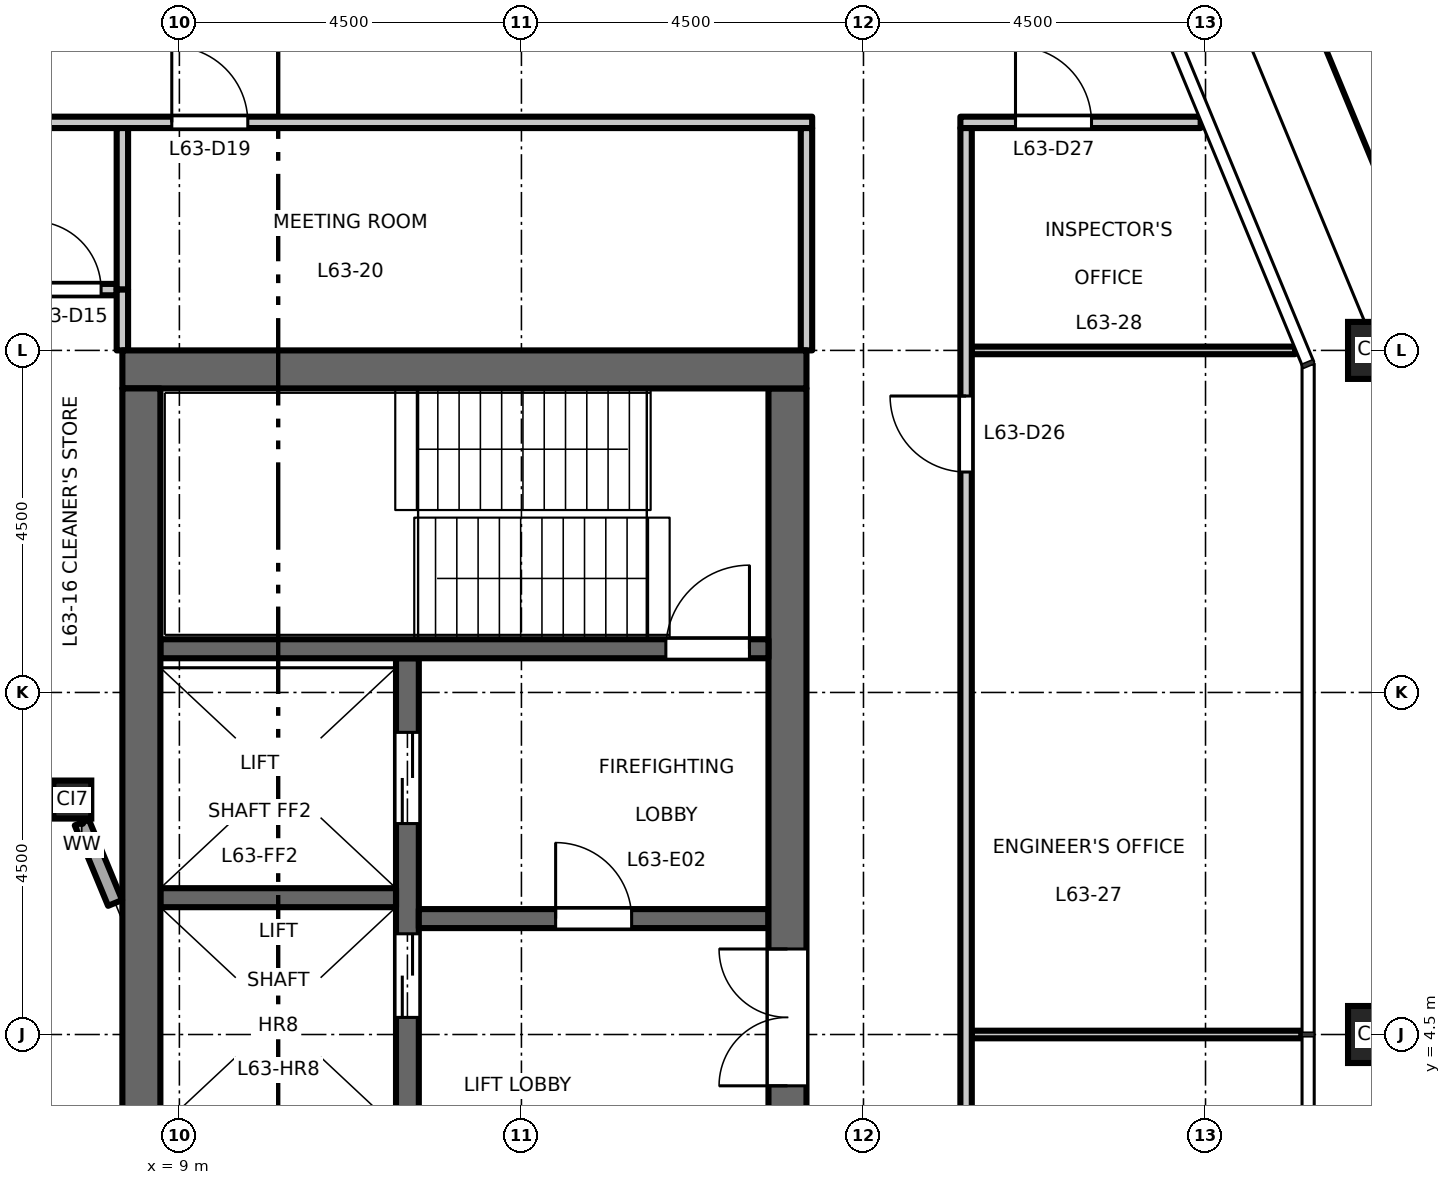
"""IFC4 building model, lengths in metres.
Left out: names, types, materials, properties, quantities, classifications, styles, units other than length and angle.
Written with IfcOpenShell. Run it as: python <this file> out.ifc"""

import sys

from ifc_helpers import new_model, si_unit, direction, frame, frame_2d, origin, origin_2d, place, context, subcontext, project, spatial, rectangle, hollow_rectangle, extrude, element, fill, save


model = new_model("IFC4")
c1 = context("Model", 3, precision=1e-05, world=origin(), true_north=direction((0.0, 1.0)))
c2 = subcontext(c1, "Body", "Model", "MODEL_VIEW")
j1 = project(units=[si_unit("LENGTHUNIT", "METRE"), si_unit("PLANEANGLEUNIT", "RADIAN")], contexts=[c1])
p1 = place(None, origin())
s1 = spatial("IfcSite", under=j1, at=p1, CompositionType="ELEMENT")
p2 = place(p1, origin())
s2 = spatial("IfcBuilding", under=s1, at=p2, CompositionType="ELEMENT")
p3 = place(p2, frame((0.0, 0.0, 294.2)))
s3 = spatial("IfcBuildingStorey", under=s2, at=p3, CompositionType="ELEMENT", Elevation=294.2)
for number, where, z_axis, x_axis in (
    (1, (24.75, 4.5, 0.0), (0.0, 0.0, 1.0), (1.0, 0.0, 0.0)),
    (2, (24.75, 13.5, 0.0), (0.0, 0.0, 1.0), (1.0, 0.0, 0.0)),
):
    element("IfcColumn", number, at=place(p3, frame(where, z_axis=z_axis, x_axis=x_axis)), inside=s3, PredefinedType="COLUMN", context=c2, shape_type="SweptSolid", body=[
        extrude(hollow_rectangle(XDim=0.75, YDim=0.75, WallThickness=0.04, at=origin_2d()), origin(), (0.0, 0.0, 1.0), 4.5),
    ])
p4 = place(p3, frame((7.591, 7.591, 0.0), z_axis=(0.0, 0.0, 1.0), x_axis=(1.0, 0.0, 0.0)))
e3 = element("IfcColumn", 3, at=p4, inside=s3, PredefinedType="COLUMN", context=c2, shape_type="SweptSolid", body=[
    extrude(hollow_rectangle(XDim=0.5, YDim=0.5, WallThickness=0.025, at=origin_2d()), origin(), (0.0, 0.0, 1.0), 4.5),
])
p5 = place(p3, frame((12.0, -9.45, 0.0), z_axis=(0.0, 0.0, 1.0), x_axis=(0.0, 1.0, 0.0)))
e4 = element("IfcWall", 4, at=p5, inside=s3, PredefinedType="SHEAR", context=c2, shape_type="SweptSolid", body=[
    extrude(rectangle(XDim=18.9, YDim=0.3, at=frame_2d((9.45, 0.0))), origin(), (0.0, 0.0, 1.0), 4.35),
])
p6 = place(p5, frame((4.725, 0.0, 0.0)))
e5 = element("IfcOpeningElement", 5, at=p6, cuts=e4, PredefinedType="OPENING", context=c2, shape_type="SweptSolid", body=[
    extrude(rectangle(XDim=1.1, YDim=2.1, at=frame_2d((0.55, 1.05))), frame((0.0, 0.16, 0.0), z_axis=(0.0, -1.0, 0.0), x_axis=(1.0, 0.0, 0.0)), (0.0, 0.0, 1.0), 0.32),
])
p7 = place(p5, frame((7.875, 0.0, 0.0)))
e6 = element("IfcOpeningElement", 6, at=p7, cuts=e4, PredefinedType="OPENING", context=c2, shape_type="SweptSolid", body=[
    extrude(rectangle(XDim=1.1, YDim=2.1, at=frame_2d((0.55, 1.05))), frame((0.0, 0.16, 0.0), z_axis=(0.0, -1.0, 0.0), x_axis=(1.0, 0.0, 0.0)), (0.0, 0.0, 1.0), 0.32),
])
p8 = place(p5, frame((11.025, 0.0, 0.0)))
e7 = element("IfcOpeningElement", 7, at=p8, cuts=e4, PredefinedType="OPENING", context=c2, shape_type="SweptSolid", body=[
    extrude(rectangle(XDim=1.1, YDim=2.1, at=frame_2d((0.55, 1.05))), frame((0.0, 0.16, 0.0), z_axis=(0.0, -1.0, 0.0), x_axis=(1.0, 0.0, 0.0)), (0.0, 0.0, 1.0), 0.32),
])
p9 = place(p5, frame((14.175, 0.0, 0.0)))
e8 = element("IfcOpeningElement", 8, at=p9, cuts=e4, PredefinedType="OPENING", context=c2, shape_type="SweptSolid", body=[
    extrude(rectangle(XDim=1.1, YDim=2.1, at=frame_2d((0.55, 1.05))), frame((0.0, 0.16, 0.0), z_axis=(0.0, -1.0, 0.0), x_axis=(1.0, 0.0, 0.0)), (0.0, 0.0, 1.0), 0.32),
])
p10 = place(p5, frame((16.725, 0.0, 0.0)))
e9 = element("IfcOpeningElement", 9, at=p10, cuts=e4, PredefinedType="OPENING", context=c2, shape_type="SweptSolid", body=[
    extrude(rectangle(XDim=1.2, YDim=2.1, at=frame_2d((0.6, 1.05))), frame((0.0, 0.16, 0.0), z_axis=(0.0, -1.0, 0.0), x_axis=(1.0, 0.0, 0.0)), (0.0, 0.0, 1.0), 0.32),
])
p11 = place(p5, frame((0.975, 0.0, 0.0)))
e10 = element("IfcOpeningElement", 10, at=p11, cuts=e4, PredefinedType="OPENING", context=c2, shape_type="SweptSolid", body=[
    extrude(rectangle(XDim=1.2, YDim=2.1, at=frame_2d((0.6, 1.05))), frame((0.0, 0.16, 0.0), z_axis=(0.0, -1.0, 0.0), x_axis=(1.0, 0.0, 0.0)), (0.0, 0.0, 1.0), 0.32),
])
p12 = place(p3, frame((12.15, 6.025, 0.0), z_axis=(0.0, 0.0, 1.0), x_axis=(1.0, 0.0, 0.0)))
e11 = element("IfcWall", 11, at=p12, inside=s3, PredefinedType="SHEAR", context=c2, shape_type="SweptSolid", body=[
    extrude(rectangle(XDim=4.6, YDim=0.25, at=frame_2d((2.3, 0.0))), origin(), (0.0, 0.0, 1.0), 4.35),
])
p13 = place(p12, frame((1.8, 0.0, 0.0)))
e12 = element("IfcOpeningElement", 12, at=p13, cuts=e11, PredefinedType="OPENING", context=c2, shape_type="SweptSolid", body=[
    extrude(rectangle(XDim=1.0, YDim=2.1, at=frame_2d((0.5, 1.05))), frame((0.0, 0.135, 0.0), z_axis=(0.0, -1.0, 0.0), x_axis=(1.0, 0.0, 0.0)), (0.0, 0.0, 1.0), 0.27),
])
p14 = place(p3, frame((17.0, -13.0, 0.0), z_axis=(0.0, 0.0, 1.0), x_axis=(0.0, 1.0, 0.0)))
e13 = element("IfcWall", 13, at=p14, inside=s3, PredefinedType="SHEAR", context=c2, shape_type="SweptSolid", body=[
    extrude(rectangle(XDim=26.0, YDim=0.5, at=frame_2d((13.0, 0.0))), origin(), (0.0, 0.0, 1.0), 4.35),
])
p15 = place(p14, frame((16.825, 0.0, 0.0)))
e14 = element("IfcOpeningElement", 14, at=p15, cuts=e13, PredefinedType="OPENING", context=c2, shape_type="SweptSolid", body=[
    extrude(rectangle(XDim=1.8, YDim=2.1, at=frame_2d((0.9, 1.05))), frame((0.0, 0.26, 0.0), z_axis=(0.0, -1.0, 0.0), x_axis=(1.0, 0.0, 0.0)), (0.0, 0.0, 1.0), 0.52),
])
p16 = place(p14, frame((7.375, 0.0, 0.0)))
e15 = element("IfcOpeningElement", 15, at=p16, cuts=e13, PredefinedType="OPENING", context=c2, shape_type="SweptSolid", body=[
    extrude(rectangle(XDim=1.8, YDim=2.1, at=frame_2d((0.9, 1.05))), frame((0.0, 0.26, 0.0), z_axis=(0.0, -1.0, 0.0), x_axis=(1.0, 0.0, 0.0)), (0.0, 0.0, 1.0), 0.52),
])
p17 = place(p3, frame((8.75, 6.3, 0.0), z_axis=(0.0, 0.0, 1.0), x_axis=(1.0, 0.0, 0.0)))
e16 = element("IfcWall", 16, at=p17, inside=s3, PredefinedType="SHEAR", context=c2, shape_type="SweptSolid", body=[
    extrude(rectangle(XDim=3.1, YDim=0.25, at=frame_2d((1.55, 0.0))), origin(), (0.0, 0.0, 1.0), 4.35),
])
p18 = place(p3, frame((8.75, 9.575, 0.0), z_axis=(0.0, 0.0, 1.0), x_axis=(1.0, 0.0, 0.0)))
e17 = element("IfcWall", 17, at=p18, inside=s3, PredefinedType="SHEAR", context=c2, shape_type="SweptSolid", body=[
    extrude(rectangle(XDim=8.0, YDim=0.25, at=frame_2d((4.0, 0.0))), origin(), (0.0, 0.0, 1.0), 4.35),
])
p19 = place(p18, frame((6.65, 0.0, 0.0)))
e18 = element("IfcOpeningElement", 18, at=p19, cuts=e17, PredefinedType="OPENING", context=c2, shape_type="SweptSolid", body=[
    extrude(rectangle(XDim=1.1, YDim=2.1, at=frame_2d((0.55, 1.05))), frame((0.0, 0.135, 0.0), z_axis=(0.0, -1.0, 0.0), x_axis=(1.0, 0.0, 0.0)), (0.0, 0.0, 1.0), 0.27),
])
p20 = place(p3, frame((8.25, 13.25, 0.0), z_axis=(0.0, 0.0, 1.0), x_axis=(1.0, 0.0, 0.0)))
e19 = element("IfcWall", 19, at=p20, inside=s3, PredefinedType="SHEAR", context=c2, shape_type="SweptSolid", body=[
    extrude(rectangle(XDim=9.0, YDim=0.5, at=frame_2d((4.5, 0.0))), origin(), (0.0, 0.0, 1.0), 4.35),
])
p21 = place(p3, frame((8.5, -13.0, 0.0), z_axis=(0.0, 0.0, 1.0), x_axis=(0.0, 1.0, 0.0)))
e20 = element("IfcWall", 20, at=p21, inside=s3, PredefinedType="SHEAR", context=c2, shape_type="SweptSolid", body=[
    extrude(rectangle(XDim=26.0, YDim=0.5, at=frame_2d((13.0, 0.0))), origin(), (0.0, 0.0, 1.0), 4.35),
])
p22 = place(p3, frame((8.154, 6.231, 0.0), z_axis=(0.0, 0.0, 1.0), x_axis=(-0.382571404949, 0.923925927829, 0.0)))
e21 = element("IfcWall", 21, at=p22, inside=s3, PredefinedType="STANDARD", context=c2, shape_type="SweptSolid", body=[
    extrude(rectangle(XDim=1.146, YDim=0.2, at=frame_2d((0.573, 0.0))), origin(), (0.0, 0.0, 1.0), 4.01),
])
p23 = place(p3, frame((7.289, 7.716, 0.0), z_axis=(0.0, 0.0, 1.0), x_axis=(-0.923919409248, 0.382587147216, 0.0)))
e22 = element("IfcWall", 22, at=p23, inside=s3, PredefinedType="STANDARD", context=c2, shape_type="SweptSolid", body=[
    extrude(rectangle(XDim=1.069, YDim=0.2, at=frame_2d((0.534, 0.0))), origin(), (0.0, 0.0, 1.0), 4.01),
])
p24 = place(p3, frame((19.425, 4.5, 0.0), z_axis=(0.0, 0.0, 1.0), x_axis=(1.0, 0.0, 0.0)))
e23 = element("IfcWall", 23, at=p24, inside=s3, PredefinedType="PARTITIONING", context=c2, shape_type="SweptSolid", body=[
    extrude(rectangle(XDim=4.335, YDim=0.1, at=frame_2d((2.167, 0.0))), origin(), (0.0, 0.0, 1.0), 4.35),
])
p25 = place(p3, frame((19.425, 13.5, 0.0), z_axis=(0.0, 0.0, 1.0), x_axis=(1.0, 0.0, 0.0)))
e24 = element("IfcWall", 24, at=p25, inside=s3, PredefinedType="PARTITIONING", context=c2, shape_type="SweptSolid", body=[
    extrude(rectangle(XDim=4.253, YDim=0.1, at=frame_2d((2.126, 0.0))), origin(), (0.0, 0.0, 1.0), 4.35),
])
p26 = place(p3, frame((6.92, 14.3, 0.0), z_axis=(0.0, 0.0, 1.0), x_axis=(1.0, 0.0, 0.0)))
e25 = element("IfcWall", 25, at=p26, inside=s3, PredefinedType="PARTITIONING", context=c2, shape_type="SweptSolid", body=[
    extrude(rectangle(XDim=1.255, YDim=0.15, at=frame_2d((0.627, 0.0))), origin(), (0.0, 0.0, 1.0), 4.35),
])
p27 = place(p26, frame((0.15, 0.0, 0.0)))
e26 = element("IfcOpeningElement", 26, at=p27, cuts=e25, PredefinedType="OPENING", context=c2, shape_type="SweptSolid", body=[
    extrude(rectangle(XDim=0.9, YDim=2.1, at=frame_2d((0.45, 1.05))), frame((0.0, 0.085, 0.0), z_axis=(0.0, -1.0, 0.0), x_axis=(1.0, 0.0, 0.0)), (0.0, 0.0, 1.0), 0.17),
])
p28 = place(p3, frame((-17.325, 16.5, 0.0), z_axis=(0.0, 0.0, 1.0), x_axis=(1.0, 0.0, 0.0)))
e27 = element("IfcWall", 27, at=p28, inside=s3, PredefinedType="PARTITIONING", context=c2, shape_type="SweptSolid", body=[
    extrude(rectangle(XDim=34.65, YDim=0.15, at=frame_2d((17.325, 0.0))), origin(), (0.0, 0.0, 1.0), 4.35),
])
p29 = place(p28, frame((9.725, 0.0, 0.0)))
e28 = element("IfcOpeningElement", 28, at=p29, cuts=e27, PredefinedType="OPENING", context=c2, shape_type="SweptSolid", body=[
    extrude(rectangle(XDim=1.0, YDim=2.1, at=frame_2d((0.5, 1.05))), frame((0.0, 0.085, 0.0), z_axis=(0.0, -1.0, 0.0), x_axis=(1.0, 0.0, 0.0)), (0.0, 0.0, 1.0), 0.17),
])
p30 = place(p28, frame((7.475, 0.0, 0.0)))
e29 = element("IfcOpeningElement", 29, at=p30, cuts=e27, PredefinedType="OPENING", context=c2, shape_type="SweptSolid", body=[
    extrude(rectangle(XDim=1.0, YDim=2.1, at=frame_2d((0.5, 1.05))), frame((0.0, 0.085, 0.0), z_axis=(0.0, -1.0, 0.0), x_axis=(1.0, 0.0, 0.0)), (0.0, 0.0, 1.0), 0.17),
])
p31 = place(p28, frame((26.225, 0.0, 0.0)))
e30 = element("IfcOpeningElement", 30, at=p31, cuts=e27, PredefinedType="OPENING", context=c2, shape_type="SweptSolid", body=[
    extrude(rectangle(XDim=1.0, YDim=2.1, at=frame_2d((0.5, 1.05))), frame((0.0, 0.085, 0.0), z_axis=(0.0, -1.0, 0.0), x_axis=(1.0, 0.0, 0.0)), (0.0, 0.0, 1.0), 0.17),
])
p32 = place(p3, frame((19.275, 16.5, 0.0), z_axis=(0.0, 0.0, 1.0), x_axis=(1.0, 0.0, 0.0)))
e31 = element("IfcWall", 31, at=p32, inside=s3, PredefinedType="PARTITIONING", context=c2, shape_type="SweptSolid", body=[
    extrude(rectangle(XDim=3.161, YDim=0.15, at=frame_2d((1.581, 0.0))), origin(), (0.0, 0.0, 1.0), 4.35),
])
p33 = place(p32, frame((0.725, 0.0, 0.0)))
e32 = element("IfcOpeningElement", 32, at=p33, cuts=e31, PredefinedType="OPENING", context=c2, shape_type="SweptSolid", body=[
    extrude(rectangle(XDim=1.0, YDim=2.1, at=frame_2d((0.5, 1.05))), frame((0.0, 0.085, 0.0), z_axis=(0.0, -1.0, 0.0), x_axis=(1.0, 0.0, 0.0)), (0.0, 0.0, 1.0), 0.17),
])
p34 = place(p3, frame((8.25, 14.3, 0.0), z_axis=(0.0, 0.0, 1.0), x_axis=(0.0, 1.0, 0.0)))
e33 = element("IfcWall", 33, at=p34, inside=s3, PredefinedType="PARTITIONING", context=c2, shape_type="SweptSolid", body=[
    extrude(rectangle(XDim=2.125, YDim=0.15, at=frame_2d((1.062, 0.0))), origin(), (0.0, 0.0, 1.0), 4.35),
])
p35 = place(p3, frame((8.25, 13.5, 0.0), z_axis=(0.0, 0.0, 1.0), x_axis=(0.0, 1.0, 0.0)))
e34 = element("IfcWall", 34, at=p35, inside=s3, PredefinedType="PARTITIONING", context=c2, shape_type="SweptSolid", body=[
    extrude(rectangle(XDim=0.8, YDim=0.15, at=frame_2d((0.4, 0.0))), origin(), (0.0, 0.0, 1.0), 4.35),
])
p36 = place(p3, frame((17.25, 13.5, 0.0), z_axis=(0.0, 0.0, 1.0), x_axis=(0.0, 1.0, 0.0)))
e35 = element("IfcWall", 35, at=p36, inside=s3, PredefinedType="PARTITIONING", context=c2, shape_type="SweptSolid", body=[
    extrude(rectangle(XDim=2.925, YDim=0.15, at=frame_2d((1.462, 0.0))), origin(), (0.0, 0.0, 1.0), 4.35),
])
p37 = place(p3, frame((19.35, -16.425, 0.0), z_axis=(0.0, 0.0, 1.0), x_axis=(0.0, 1.0, 0.0)))
e36 = element("IfcWall", 36, at=p37, inside=s3, PredefinedType="PARTITIONING", context=c2, shape_type="SweptSolid", body=[
    extrude(rectangle(XDim=32.85, YDim=0.15, at=frame_2d((16.425, 0.0))), origin(), (0.0, 0.0, 1.0), 4.35),
])
p38 = place(p37, frame((10.325, 0.0, 0.0)))
e37 = element("IfcOpeningElement", 37, at=p38, cuts=e36, PredefinedType="OPENING", context=c2, shape_type="SweptSolid", body=[
    extrude(rectangle(XDim=1.0, YDim=2.1, at=frame_2d((0.5, 1.05))), frame((0.0, 0.085, 0.0), z_axis=(0.0, -1.0, 0.0), x_axis=(1.0, 0.0, 0.0)), (0.0, 0.0, 1.0), 0.17),
])
p39 = place(p37, frame((12.575, 0.0, 0.0)))
e38 = element("IfcOpeningElement", 38, at=p39, cuts=e36, PredefinedType="OPENING", context=c2, shape_type="SweptSolid", body=[
    extrude(rectangle(XDim=1.0, YDim=2.1, at=frame_2d((0.5, 1.05))), frame((0.0, 0.085, 0.0), z_axis=(0.0, -1.0, 0.0), x_axis=(1.0, 0.0, 0.0)), (0.0, 0.0, 1.0), 0.17),
])
p40 = place(p37, frame((28.325, 0.0, 0.0)))
e39 = element("IfcOpeningElement", 39, at=p40, cuts=e36, PredefinedType="OPENING", context=c2, shape_type="SweptSolid", body=[
    extrude(rectangle(XDim=1.0, YDim=2.1, at=frame_2d((0.5, 1.05))), frame((0.0, 0.085, 0.0), z_axis=(0.0, -1.0, 0.0), x_axis=(1.0, 0.0, 0.0)), (0.0, 0.0, 1.0), 0.17),
])
p41 = place(p13, origin())
e40 = element("IfcDoor", 40, at=p41, inside=s3, OperationType="SINGLE_SWING_RIGHT", PredefinedType="DOOR", context=c2, shape_type="SweptSolid", body=[
    extrude(rectangle(XDim=1.0, YDim=2.1, at=frame_2d((0.5, 1.05))), frame((0.0, 0.025, 0.0), z_axis=(0.0, -1.0, 0.0), x_axis=(1.0, 0.0, 0.0)), (0.0, 0.0, 1.0), 0.05),
])
fill(e12, e40)
p42 = place(p19, origin())
e41 = element("IfcDoor", 41, at=p42, inside=s3, OperationType="SINGLE_SWING_LEFT", PredefinedType="DOOR", context=c2, shape_type="SweptSolid", body=[
    extrude(rectangle(XDim=1.1, YDim=2.1, at=frame_2d((0.55, 1.05))), frame((0.0, 0.025, 0.0), z_axis=(0.0, -1.0, 0.0), x_axis=(1.0, 0.0, 0.0)), (0.0, 0.0, 1.0), 0.05),
])
fill(e18, e41)
p43 = place(p15, origin())
e42 = element("IfcDoor", 42, at=p43, inside=s3, OperationType="DOUBLE_DOOR_DOUBLE_SWING", PredefinedType="DOOR", context=c2, shape_type="SweptSolid", body=[
    extrude(rectangle(XDim=1.8, YDim=2.1, at=frame_2d((0.9, 1.05))), frame((0.0, 0.025, 0.0), z_axis=(0.0, -1.0, 0.0), x_axis=(1.0, 0.0, 0.0)), (0.0, 0.0, 1.0), 0.05),
])
fill(e14, e42)
p44 = place(p9, origin())
e43 = element("IfcDoor", 43, at=p44, inside=s3, OperationType="DOUBLE_DOOR_SLIDING", PredefinedType="DOOR", context=c2, shape_type="SweptSolid", body=[
    extrude(rectangle(XDim=1.1, YDim=2.1, at=frame_2d((0.55, 1.05))), frame((0.0, 0.025, 0.0), z_axis=(0.0, -1.0, 0.0), x_axis=(1.0, 0.0, 0.0)), (0.0, 0.0, 1.0), 0.05),
])
fill(e8, e43)
p45 = place(p10, origin())
e44 = element("IfcDoor", 44, at=p45, inside=s3, OperationType="DOUBLE_DOOR_SLIDING", PredefinedType="DOOR", context=c2, shape_type="SweptSolid", body=[
    extrude(rectangle(XDim=1.2, YDim=2.1, at=frame_2d((0.6, 1.05))), frame((0.0, 0.025, 0.0), z_axis=(0.0, -1.0, 0.0), x_axis=(1.0, 0.0, 0.0)), (0.0, 0.0, 1.0), 0.05),
])
fill(e9, e44)
p46 = place(p27, origin())
e45 = element("IfcDoor", 45, at=p46, inside=s3, OperationType="SINGLE_SWING_LEFT", PredefinedType="DOOR", context=c2, shape_type="SweptSolid", body=[
    extrude(rectangle(XDim=0.9, YDim=2.1, at=frame_2d((0.45, 1.05))), frame((0.0, 0.025, 0.0), z_axis=(0.0, -1.0, 0.0), x_axis=(1.0, 0.0, 0.0)), (0.0, 0.0, 1.0), 0.05),
])
fill(e26, e45)
p47 = place(p31, origin())
e46 = element("IfcDoor", 46, at=p47, inside=s3, OperationType="SINGLE_SWING_LEFT", PredefinedType="DOOR", context=c2, shape_type="SweptSolid", body=[
    extrude(rectangle(XDim=1.0, YDim=2.1, at=frame_2d((0.5, 1.05))), frame((0.0, 0.025, 0.0), z_axis=(0.0, -1.0, 0.0), x_axis=(1.0, 0.0, 0.0)), (0.0, 0.0, 1.0), 0.05),
])
fill(e30, e46)
p48 = place(p40, origin())
e47 = element("IfcDoor", 47, at=p48, inside=s3, OperationType="SINGLE_SWING_RIGHT", PredefinedType="DOOR", context=c2, shape_type="SweptSolid", body=[
    extrude(rectangle(XDim=1.0, YDim=2.1, at=frame_2d((0.5, 1.05))), frame((0.0, 0.025, 0.0), z_axis=(0.0, -1.0, 0.0), x_axis=(1.0, 0.0, 0.0)), (0.0, 0.0, 1.0), 0.05),
])
fill(e39, e47)
p49 = place(p33, origin())
e48 = element("IfcDoor", 48, at=p49, inside=s3, OperationType="SINGLE_SWING_LEFT", PredefinedType="DOOR", context=c2, shape_type="SweptSolid", body=[
    extrude(rectangle(XDim=1.0, YDim=2.1, at=frame_2d((0.5, 1.05))), frame((0.0, 0.025, 0.0), z_axis=(0.0, -1.0, 0.0), x_axis=(1.0, 0.0, 0.0)), (0.0, 0.0, 1.0), 0.05),
])
fill(e32, e48)
save(model, sys.argv[1])
